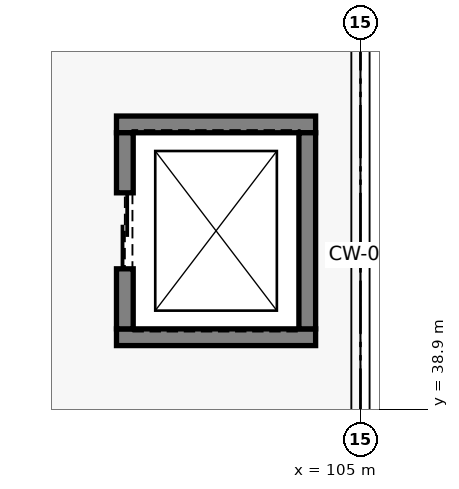
"""IFC4 building model, lengths in metres.
Left out: names, types, materials, properties, quantities, classifications, styles, units other than length and angle.
Written with IfcOpenShell. Run it as: python <this file> out.ifc"""

import sys

from ifc_helpers import new_model, si_unit, direction, frame, frame_2d, origin, place, context, subcontext, project, spatial, rectangle, extrude, element, fill, save


model = new_model("IFC4")
c1 = context("Model", 3, precision=1e-05, world=origin(), true_north=direction((0.0, 1.0)))
c2 = subcontext(c1, "Body", "Model", "MODEL_VIEW")
j1 = project(units=[si_unit("LENGTHUNIT", "METRE"), si_unit("PLANEANGLEUNIT", "RADIAN")], contexts=[c1])
p1 = place(None, origin())
s1 = spatial("IfcSite", under=j1, at=p1, CompositionType="ELEMENT")
p2 = place(p1, origin())
s2 = spatial("IfcBuilding", under=s1, at=p2, CompositionType="ELEMENT")
p3 = place(p2, frame((0.0, 0.0, 4.8)))
s3 = spatial("IfcBuildingStorey", under=s2, at=p3, CompositionType="ELEMENT", Elevation=4.8)
for number, where, z_axis, x_axis in (
    (1, (101.79, 39.85, 0.0), (0.0, 0.0, 1.0), (1.0, 0.0, 0.0)),
    (2, (101.79, 42.65, 0.0), (0.0, 0.0, 1.0), (1.0, 0.0, 0.0)),
):
    element("IfcWall", number, at=place(p3, frame(where, z_axis=z_axis, x_axis=x_axis)), inside=s3, PredefinedType="SOLIDWALL", context=c2, shape_type="SweptSolid", body=[
        extrude(rectangle(XDim=2.62, YDim=0.22, at=frame_2d((1.31, 0.0))), origin(), (0.0, 0.0, 1.0), 3.92),
    ])
p4 = place(p3, frame((101.9, 39.96, 0.0), z_axis=(0.0, 0.0, 1.0), x_axis=(0.0, 1.0, 0.0)))
e3 = element("IfcWall", 3, at=p4, inside=s3, PredefinedType="SOLIDWALL", context=c2, shape_type="SweptSolid", body=[
    extrude(rectangle(XDim=2.58, YDim=0.22, at=frame_2d((1.29, 0.0))), origin(), (0.0, 0.0, 1.0), 3.92),
])
p5 = place(p4, frame((0.79, 0.0, 0.0)))
e4 = element("IfcOpeningElement", 4, at=p5, cuts=e3, PredefinedType="OPENING", context=c2, shape_type="SweptSolid", body=[
    extrude(rectangle(XDim=1.0, YDim=2.15, at=frame_2d((0.5, 1.075))), frame((0.0, 0.12, 0.0), z_axis=(0.0, -1.0, 0.0), x_axis=(1.0, 0.0, 0.0)), (0.0, 0.0, 1.0), 0.24),
])
p6 = place(p3, frame((104.3, 39.96, 0.0), z_axis=(0.0, 0.0, 1.0), x_axis=(0.0, 1.0, 0.0)))
e5 = element("IfcWall", 5, at=p6, inside=s3, PredefinedType="SOLIDWALL", context=c2, shape_type="SweptSolid", body=[
    extrude(rectangle(XDim=2.58, YDim=0.22, at=frame_2d((1.29, 0.0))), origin(), (0.0, 0.0, 1.0), 3.92),
])
p7 = place(p5, origin())
e6 = element("IfcDoor", 6, at=p7, inside=s3, OperationType="SLIDING_TO_LEFT", PredefinedType="DOOR", context=c2, shape_type="SweptSolid", body=[
    extrude(rectangle(XDim=1.0, YDim=2.15, at=frame_2d((0.5, 1.075))), frame((0.0, 0.025, 0.0), z_axis=(0.0, -1.0, 0.0), x_axis=(1.0, 0.0, 0.0)), (0.0, 0.0, 1.0), 0.05),
])
fill(e4, e6)
save(model, sys.argv[1])
